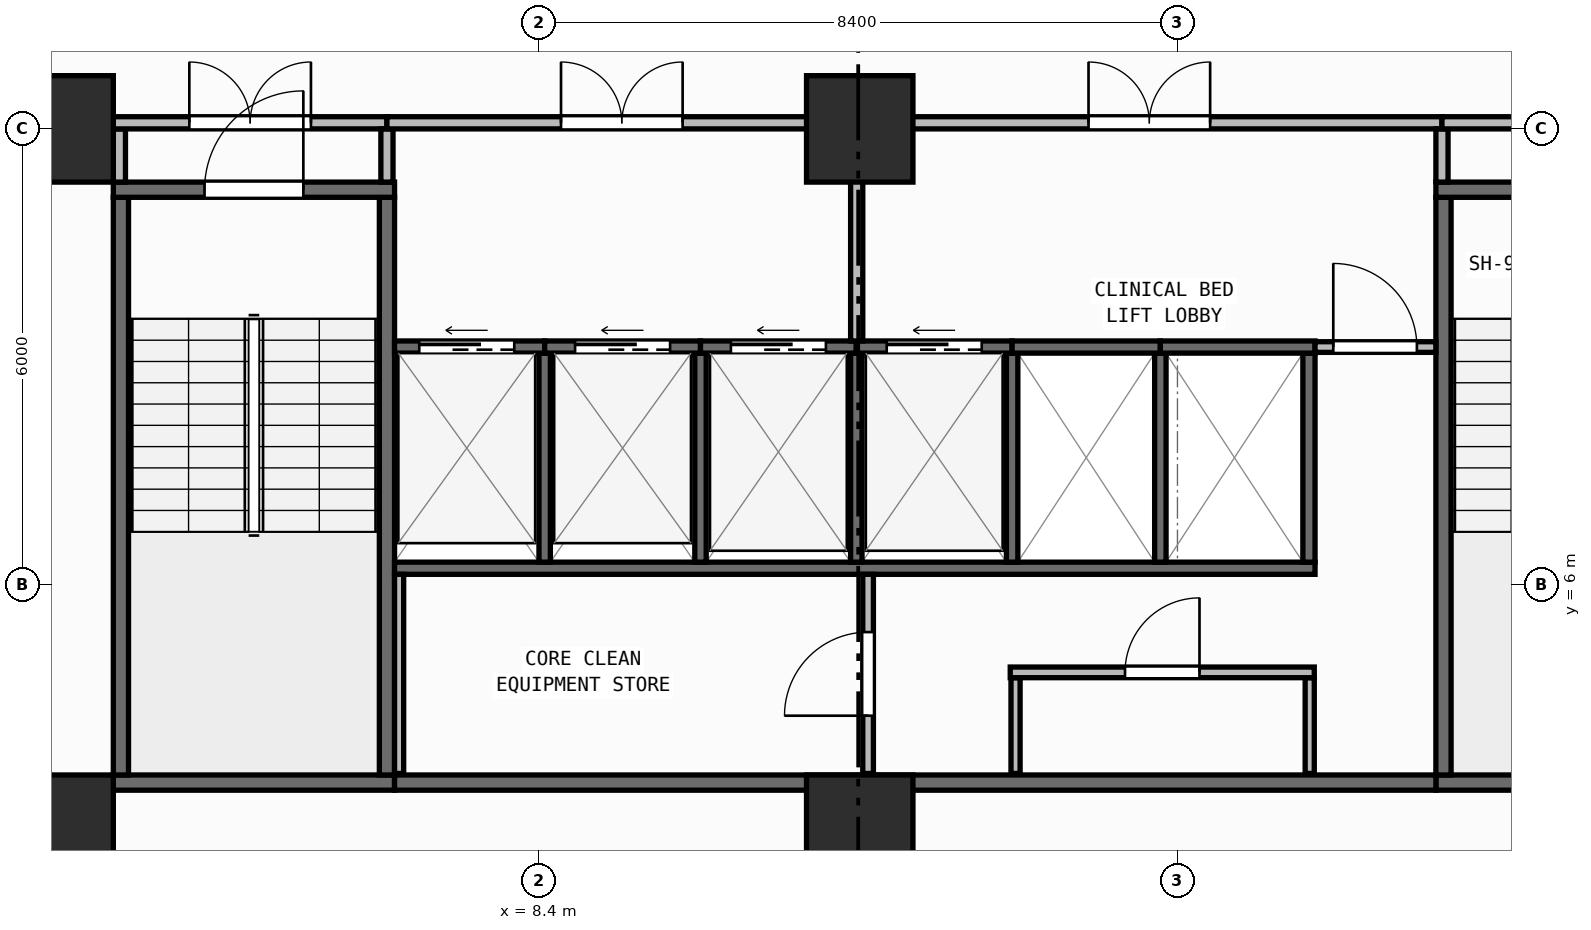
"""IFC4 building model, lengths in metres.
Left out: names, types, materials, properties, quantities, classifications, styles, units other than length and angle.
Written with IfcOpenShell. Run it as: python <this file> out.ifc"""

import sys

from ifc_helpers import new_model, si_unit, direction, frame, frame_2d, origin, origin_2d, place, context, subcontext, project, spatial, rectangle, extrude, element, fill, save


model = new_model("IFC4")
c1 = context("Model", 3, precision=1e-05, world=origin(), true_north=direction((0.0, 1.0)))
c2 = subcontext(c1, "Body", "Model", "MODEL_VIEW")
j1 = project(units=[si_unit("LENGTHUNIT", "METRE"), si_unit("PLANEANGLEUNIT", "RADIAN")], contexts=[c1])
p1 = place(None, origin())
s1 = spatial("IfcSite", under=j1, at=p1, CompositionType="ELEMENT")
p2 = place(p1, origin())
s2 = spatial("IfcBuilding", under=s1, at=p2, CompositionType="ELEMENT")
p3 = place(p2, frame((0.0, 0.0, 42.25)))
s3 = spatial("IfcBuildingStorey", under=s2, at=p3, CompositionType="ELEMENT", Elevation=42.25)
for number, where, z_axis, x_axis in (
    (1, (2.1, 2.8, 0.0), (0.0, 0.0, 1.0), (1.0, 0.0, 0.0)),
    (2, (12.62, 2.8, 0.0), (0.0, 0.0, 1.0), (1.0, 0.0, 0.0)),
    (3, (2.1, 12.0, 0.0), (0.0, 0.0, 1.0), (1.0, 0.0, 0.0)),
    (4, (12.62, 12.0, 0.0), (0.0, 0.0, 1.0), (1.0, 0.0, 0.0)),
):
    element("IfcColumn", number, at=place(p3, frame(where, z_axis=z_axis, x_axis=x_axis)), inside=s3, PredefinedType="COLUMN", context=c2, shape_type="SweptSolid", body=[
        extrude(rectangle(XDim=1.4, YDim=1.4, at=origin_2d()), origin(), (0.0, 0.0, 1.0), 3.95),
    ])
p4 = place(p3, frame((2.76, 0.174, 0.0), z_axis=(0.0, 0.0, 1.0), x_axis=(0.996571478456, 0.082736257641, 0.0)))
e5 = element("IfcWall", 5, at=p4, inside=s3, PredefinedType="STANDARD", context=c2, shape_type="SweptSolid", body=[
    extrude(rectangle(XDim=52.861, YDim=0.26, at=frame_2d((26.431, 0.0))), origin(), (0.0, 0.0, 1.0), 3.71),
])
p5 = place(p4, frame((25.231, 0.0, 0.9)))
e6 = element("IfcOpeningElement", 6, at=p5, cuts=e5, PredefinedType="OPENING", context=c2, shape_type="SweptSolid", body=[
    extrude(rectangle(XDim=2.4, YDim=1.65, at=frame_2d((1.2, 0.825))), frame((0.0, 0.14, 0.0), z_axis=(0.0, -1.0, 0.0), x_axis=(1.0, 0.0, 0.0)), (0.0, 0.0, 1.0), 0.28),
])
p6 = place(p3, frame((2.8, 3.4, 0.0), z_axis=(0.0, 0.0, 1.0), x_axis=(1.0, 0.0, 0.0)))
e7 = element("IfcWall", 7, at=p6, inside=s3, PredefinedType="SHEAR", context=c2, shape_type="SweptSolid", body=[
    extrude(rectangle(XDim=3.7, YDim=0.2, at=frame_2d((1.85, 0.0))), origin(), (0.0, 0.0, 1.0), 3.71),
])
for number, where, z_axis, x_axis in (
    (8, (2.9, 3.5, 0.0), (0.0, 0.0, 1.0), (0.0, 1.0, 0.0)),
    (9, (6.4, 3.5, 0.0), (0.0, 0.0, 1.0), (0.0, 1.0, 0.0)),
):
    element("IfcWall", number, at=place(p3, frame(where, z_axis=z_axis, x_axis=x_axis)), inside=s3, PredefinedType="SHEAR", context=c2, shape_type="SweptSolid", body=[
        extrude(rectangle(XDim=7.6, YDim=0.2, at=frame_2d((3.8, 0.0))), origin(), (0.0, 0.0, 1.0), 3.71),
    ])
p7 = place(p3, frame((2.8, 11.2, 0.0), z_axis=(0.0, 0.0, 1.0), x_axis=(1.0, 0.0, 0.0)))
e10 = element("IfcWall", 10, at=p7, inside=s3, PredefinedType="SHEAR", context=c2, shape_type="SweptSolid", body=[
    extrude(rectangle(XDim=3.7, YDim=0.2, at=frame_2d((1.85, 0.0))), origin(), (0.0, 0.0, 1.0), 3.71),
])
p8 = place(p7, frame((1.2, 0.0, 0.0)))
e11 = element("IfcOpeningElement", 11, at=p8, cuts=e10, PredefinedType="OPENING", context=c2, shape_type="SweptSolid", body=[
    extrude(rectangle(XDim=1.3, YDim=2.15, at=frame_2d((0.65, 1.075))), frame((0.0, 0.11, 0.0), z_axis=(0.0, -1.0, 0.0), x_axis=(1.0, 0.0, 0.0)), (0.0, 0.0, 1.0), 0.22),
])
p9 = place(p3, frame((20.2, 3.4, 0.0), z_axis=(0.0, 0.0, 1.0), x_axis=(1.0, 0.0, 0.0)))
e12 = element("IfcWall", 12, at=p9, inside=s3, PredefinedType="SHEAR", context=c2, shape_type="SweptSolid", body=[
    extrude(rectangle(XDim=3.7, YDim=0.2, at=frame_2d((1.85, 0.0))), origin(), (0.0, 0.0, 1.0), 3.71),
])
p10 = place(p3, frame((20.3, 3.5, 0.0), z_axis=(0.0, 0.0, 1.0), x_axis=(0.0, 1.0, 0.0)))
e13 = element("IfcWall", 13, at=p10, inside=s3, PredefinedType="SHEAR", context=c2, shape_type="SweptSolid", body=[
    extrude(rectangle(XDim=7.6, YDim=0.2, at=frame_2d((3.8, 0.0))), origin(), (0.0, 0.0, 1.0), 3.71),
])
p11 = place(p3, frame((20.2, 11.2, 0.0), z_axis=(0.0, 0.0, 1.0), x_axis=(1.0, 0.0, 0.0)))
e14 = element("IfcWall", 14, at=p11, inside=s3, PredefinedType="SHEAR", context=c2, shape_type="SweptSolid", body=[
    extrude(rectangle(XDim=3.7, YDim=0.2, at=frame_2d((1.85, 0.0))), origin(), (0.0, 0.0, 1.0), 3.71),
])
p12 = place(p11, frame((1.2, 0.0, 0.0)))
e15 = element("IfcOpeningElement", 15, at=p12, cuts=e14, PredefinedType="OPENING", context=c2, shape_type="SweptSolid", body=[
    extrude(rectangle(XDim=1.3, YDim=2.15, at=frame_2d((0.65, 1.075))), frame((0.0, 0.11, 0.0), z_axis=(0.0, -1.0, 0.0), x_axis=(1.0, 0.0, 0.0)), (0.0, 0.0, 1.0), 0.22),
])
p13 = place(p3, frame((6.5, 3.4, 0.0), z_axis=(0.0, 0.0, 1.0), x_axis=(1.0, 0.0, 0.0)))
e16 = element("IfcWall", 16, at=p13, inside=s3, PredefinedType="SHEAR", context=c2, shape_type="SweptSolid", body=[
    extrude(rectangle(XDim=13.7, YDim=0.2, at=frame_2d((6.85, 0.0))), origin(), (0.0, 0.0, 1.0), 3.71),
])
p14 = place(p3, frame((6.5, 6.22, 0.0), z_axis=(0.0, 0.0, 1.0), x_axis=(1.0, 0.0, 0.0)))
e17 = element("IfcWall", 17, at=p14, inside=s3, PredefinedType="SHEAR", context=c2, shape_type="SweptSolid", body=[
    extrude(rectangle(XDim=12.11, YDim=0.16, at=frame_2d((6.055, 0.0))), origin(), (0.0, 0.0, 1.0), 3.71),
])
p15 = place(p3, frame((18.53, 6.3, 0.0), z_axis=(0.0, 0.0, 1.0), x_axis=(0.0, 1.0, 0.0)))
e18 = element("IfcWall", 18, at=p15, inside=s3, PredefinedType="SHEAR", context=c2, shape_type="SweptSolid", body=[
    extrude(rectangle(XDim=2.75, YDim=0.16, at=frame_2d((1.375, 0.0))), origin(), (0.0, 0.0, 1.0), 3.71),
])
for number, where, z_axis, x_axis in (
    (19, (8.475, 6.3, 0.0), (0.0, 0.0, 1.0), (0.0, 1.0, 0.0)),
    (20, (10.525, 6.3, 0.0), (0.0, 0.0, 1.0), (0.0, 1.0, 0.0)),
    (21, (12.575, 6.3, 0.0), (0.0, 0.0, 1.0), (0.0, 1.0, 0.0)),
    (22, (14.625, 6.3, 0.0), (0.0, 0.0, 1.0), (0.0, 1.0, 0.0)),
    (23, (16.575, 6.3, 0.0), (0.0, 0.0, 1.0), (0.0, 1.0, 0.0)),
):
    element("IfcWall", number, at=place(p3, frame(where, z_axis=z_axis, x_axis=x_axis)), inside=s3, PredefinedType="SHEAR", context=c2, shape_type="SweptSolid", body=[
        extrude(rectangle(XDim=2.75, YDim=0.15, at=frame_2d((1.375, 0.0))), origin(), (0.0, 0.0, 1.0), 3.71),
    ])
p16 = place(p3, frame((6.5, 9.13, 0.0), z_axis=(0.0, 0.0, 1.0), x_axis=(1.0, 0.0, 0.0)))
e24 = element("IfcWall", 24, at=p16, inside=s3, PredefinedType="SHEAR", context=c2, shape_type="SweptSolid", body=[
    extrude(rectangle(XDim=1.975, YDim=0.16, at=frame_2d((0.988, 0.0))), origin(), (0.0, 0.0, 1.0), 3.71),
])
p17 = place(p16, frame((0.325, 0.0, 0.0)))
e25 = element("IfcOpeningElement", 25, at=p17, cuts=e24, PredefinedType="OPENING", context=c2, shape_type="SweptSolid", body=[
    extrude(rectangle(XDim=1.25, YDim=2.15, at=frame_2d((0.625, 1.075))), frame((0.0, 0.09, 0.0), z_axis=(0.0, -1.0, 0.0), x_axis=(1.0, 0.0, 0.0)), (0.0, 0.0, 1.0), 0.18),
])
p18 = place(p3, frame((8.475, 9.13, 0.0), z_axis=(0.0, 0.0, 1.0), x_axis=(1.0, 0.0, 0.0)))
e26 = element("IfcWall", 26, at=p18, inside=s3, PredefinedType="SHEAR", context=c2, shape_type="SweptSolid", body=[
    extrude(rectangle(XDim=2.05, YDim=0.16, at=frame_2d((1.025, 0.0))), origin(), (0.0, 0.0, 1.0), 3.71),
])
p19 = place(p18, frame((0.4, 0.0, 0.0)))
e27 = element("IfcOpeningElement", 27, at=p19, cuts=e26, PredefinedType="OPENING", context=c2, shape_type="SweptSolid", body=[
    extrude(rectangle(XDim=1.25, YDim=2.15, at=frame_2d((0.625, 1.075))), frame((0.0, 0.09, 0.0), z_axis=(0.0, -1.0, 0.0), x_axis=(1.0, 0.0, 0.0)), (0.0, 0.0, 1.0), 0.18),
])
p20 = place(p3, frame((10.525, 9.13, 0.0), z_axis=(0.0, 0.0, 1.0), x_axis=(1.0, 0.0, 0.0)))
e28 = element("IfcWall", 28, at=p20, inside=s3, PredefinedType="SHEAR", context=c2, shape_type="SweptSolid", body=[
    extrude(rectangle(XDim=2.05, YDim=0.16, at=frame_2d((1.025, 0.0))), origin(), (0.0, 0.0, 1.0), 3.71),
])
p21 = place(p20, frame((0.4, 0.0, 0.0)))
e29 = element("IfcOpeningElement", 29, at=p21, cuts=e28, PredefinedType="OPENING", context=c2, shape_type="SweptSolid", body=[
    extrude(rectangle(XDim=1.25, YDim=2.15, at=frame_2d((0.625, 1.075))), frame((0.0, 0.09, 0.0), z_axis=(0.0, -1.0, 0.0), x_axis=(1.0, 0.0, 0.0)), (0.0, 0.0, 1.0), 0.18),
])
p22 = place(p3, frame((12.575, 9.13, 0.0), z_axis=(0.0, 0.0, 1.0), x_axis=(1.0, 0.0, 0.0)))
e30 = element("IfcWall", 30, at=p22, inside=s3, PredefinedType="SHEAR", context=c2, shape_type="SweptSolid", body=[
    extrude(rectangle(XDim=2.05, YDim=0.16, at=frame_2d((1.025, 0.0))), origin(), (0.0, 0.0, 1.0), 3.71),
])
p23 = place(p22, frame((0.4, 0.0, 0.0)))
e31 = element("IfcOpeningElement", 31, at=p23, cuts=e30, PredefinedType="OPENING", context=c2, shape_type="SweptSolid", body=[
    extrude(rectangle(XDim=1.25, YDim=2.15, at=frame_2d((0.625, 1.075))), frame((0.0, 0.09, 0.0), z_axis=(0.0, -1.0, 0.0), x_axis=(1.0, 0.0, 0.0)), (0.0, 0.0, 1.0), 0.18),
])
p24 = place(p3, frame((14.625, 9.13, 0.0), z_axis=(0.0, 0.0, 1.0), x_axis=(1.0, 0.0, 0.0)))
e32 = element("IfcWall", 32, at=p24, inside=s3, PredefinedType="SHEAR", context=c2, shape_type="SweptSolid", body=[
    extrude(rectangle(XDim=1.95, YDim=0.16, at=frame_2d((0.975, 0.0))), origin(), (0.0, 0.0, 1.0), 3.71),
])
p25 = place(p3, frame((16.575, 9.13, 0.0), z_axis=(0.0, 0.0, 1.0), x_axis=(1.0, 0.0, 0.0)))
e33 = element("IfcWall", 33, at=p25, inside=s3, PredefinedType="SHEAR", context=c2, shape_type="SweptSolid", body=[
    extrude(rectangle(XDim=2.035, YDim=0.16, at=frame_2d((1.018, 0.0))), origin(), (0.0, 0.0, 1.0), 3.71),
])
p26 = place(p3, frame((6.56, 3.52, 0.0), z_axis=(0.0, 0.0, 1.0), x_axis=(0.0, 1.0, 0.0)))
e34 = element("IfcWall", 34, at=p26, inside=s3, PredefinedType="PARTITIONING", context=c2, shape_type="SweptSolid", body=[
    extrude(rectangle(XDim=2.62, YDim=0.12, at=frame_2d((1.31, 0.0))), origin(), (0.0, 0.0, 1.0), 3.71),
])
p27 = place(p3, frame((12.73, 3.52, 0.0), z_axis=(0.0, 0.0, 1.0), x_axis=(0.0, 1.0, 0.0)))
e35 = element("IfcWall", 35, at=p27, inside=s3, PredefinedType="PARTITIONING", context=c2, shape_type="SweptSolid", body=[
    extrude(rectangle(XDim=2.62, YDim=0.14, at=frame_2d((1.31, 0.0))), origin(), (0.0, 0.0, 1.0), 3.71),
])
p28 = place(p27, frame((0.76, 0.0, 0.0)))
e36 = element("IfcOpeningElement", 36, at=p28, cuts=e35, PredefinedType="OPENING", context=c2, shape_type="SweptSolid", body=[
    extrude(rectangle(XDim=1.1, YDim=2.1, at=frame_2d((0.55, 1.05))), frame((0.0, 0.08, 0.0), z_axis=(0.0, -1.0, 0.0), x_axis=(1.0, 0.0, 0.0)), (0.0, 0.0, 1.0), 0.16),
])
for number, where, z_axis, x_axis in (
    (37, (14.67, 3.52, 0.0), (0.0, 0.0, 1.0), (0.0, 1.0, 0.0)),
    (38, (18.54, 3.52, 0.0), (0.0, 0.0, 1.0), (0.0, 1.0, 0.0)),
):
    element("IfcWall", number, at=place(p3, frame(where, z_axis=z_axis, x_axis=x_axis)), inside=s3, PredefinedType="PARTITIONING", context=c2, shape_type="SweptSolid", body=[
        extrude(rectangle(XDim=1.26, YDim=0.12, at=frame_2d((0.63, 0.0))), origin(), (0.0, 0.0, 1.0), 3.71),
    ])
p29 = place(p3, frame((14.6, 4.85, 0.0), z_axis=(0.0, 0.0, 1.0), x_axis=(1.0, 0.0, 0.0)))
e39 = element("IfcWall", 39, at=p29, inside=s3, PredefinedType="PARTITIONING", context=c2, shape_type="SweptSolid", body=[
    extrude(rectangle(XDim=4.0, YDim=0.14, at=frame_2d((2.0, 0.0))), origin(), (0.0, 0.0, 1.0), 3.71),
])
p30 = place(p29, frame((1.51, 0.0, 0.0)))
e40 = element("IfcOpeningElement", 40, at=p30, cuts=e39, PredefinedType="OPENING", context=c2, shape_type="SweptSolid", body=[
    extrude(rectangle(XDim=0.98, YDim=2.1, at=frame_2d((0.49, 1.05))), frame((0.0, 0.08, 0.0), z_axis=(0.0, -1.0, 0.0), x_axis=(1.0, 0.0, 0.0)), (0.0, 0.0, 1.0), 0.16),
])
p31 = place(p3, frame((18.61, 9.13, 0.0), z_axis=(0.0, 0.0, 1.0), x_axis=(1.0, 0.0, 0.0)))
e41 = element("IfcWall", 41, at=p31, inside=s3, PredefinedType="PARTITIONING", context=c2, shape_type="SweptSolid", body=[
    extrude(rectangle(XDim=1.59, YDim=0.14, at=frame_2d((0.795, 0.0))), origin(), (0.0, 0.0, 1.0), 3.71),
])
p32 = place(p31, frame((0.24, 0.0, 0.0)))
e42 = element("IfcOpeningElement", 42, at=p32, cuts=e41, PredefinedType="OPENING", context=c2, shape_type="SweptSolid", body=[
    extrude(rectangle(XDim=1.1, YDim=2.1, at=frame_2d((0.55, 1.05))), frame((0.0, 0.08, 0.0), z_axis=(0.0, -1.0, 0.0), x_axis=(1.0, 0.0, 0.0)), (0.0, 0.0, 1.0), 0.16),
])
p33 = place(p3, frame((2.88, 11.3, 0.0), z_axis=(0.0, 0.0, 1.0), x_axis=(0.0, 1.0, 0.0)))
e43 = element("IfcWall", 43, at=p33, inside=s3, PredefinedType="PARTITIONING", context=c2, shape_type="SweptSolid", body=[
    extrude(rectangle(XDim=0.7, YDim=0.16, at=frame_2d((0.35, 0.0))), origin(), (0.0, 0.0, 1.0), 3.71),
])
p34 = place(p3, frame((2.8, 12.08, 0.0), z_axis=(0.0, 0.0, 1.0), x_axis=(1.0, 0.0, 0.0)))
e44 = element("IfcWall", 44, at=p34, inside=s3, PredefinedType="PARTITIONING", context=c2, shape_type="SweptSolid", body=[
    extrude(rectangle(XDim=3.6, YDim=0.16, at=frame_2d((1.8, 0.0))), origin(), (0.0, 0.0, 1.0), 3.073),
])
p35 = place(p34, frame((1.0, 0.0, 0.0)))
e45 = element("IfcOpeningElement", 45, at=p35, cuts=e44, PredefinedType="OPENING", context=c2, shape_type="SweptSolid", body=[
    extrude(rectangle(XDim=1.6, YDim=2.05, at=frame_2d((0.8, 1.025))), frame((0.0, 0.09, 0.0), z_axis=(0.0, -1.0, 0.0), x_axis=(1.0, 0.0, 0.0)), (0.0, 0.0, 1.0), 0.18),
])
p36 = place(p3, frame((6.4, 11.3, 0.0), z_axis=(0.0, 0.0, 1.0), x_axis=(0.0, 1.0, 0.0)))
e46 = element("IfcWall", 46, at=p36, inside=s3, PredefinedType="PARTITIONING", context=c2, shape_type="SweptSolid", body=[
    extrude(rectangle(XDim=0.7, YDim=0.16, at=frame_2d((0.35, 0.0))), origin(), (0.0, 0.0, 1.0), 3.71),
])
p37 = place(p3, frame((6.4, 12.08, 0.0), z_axis=(0.0, 0.0, 1.0), x_axis=(1.0, 0.0, 0.0)))
e47 = element("IfcWall", 47, at=p37, inside=s3, PredefinedType="PARTITIONING", context=c2, shape_type="SweptSolid", body=[
    extrude(rectangle(XDim=6.18, YDim=0.16, at=frame_2d((3.09, 0.0))), origin(), (0.0, 0.0, 1.0), 3.073),
])
p38 = place(p37, frame((2.29, 0.0, 0.0)))
e48 = element("IfcOpeningElement", 48, at=p38, cuts=e47, PredefinedType="OPENING", context=c2, shape_type="SweptSolid", body=[
    extrude(rectangle(XDim=1.6, YDim=2.05, at=frame_2d((0.8, 1.025))), frame((0.0, 0.09, 0.0), z_axis=(0.0, -1.0, 0.0), x_axis=(1.0, 0.0, 0.0)), (0.0, 0.0, 1.0), 0.18),
])
p39 = place(p3, frame((12.58, 9.21, 0.0), z_axis=(0.0, 0.0, 1.0), x_axis=(0.0, 1.0, 0.0)))
e49 = element("IfcWall", 49, at=p39, inside=s3, PredefinedType="PARTITIONING", context=c2, shape_type="SweptSolid", body=[
    extrude(rectangle(XDim=2.79, YDim=0.16, at=frame_2d((1.395, 0.0))), origin(), (0.0, 0.0, 1.0), 3.71),
])
p40 = place(p3, frame((12.58, 12.08, 0.0), z_axis=(0.0, 0.0, 1.0), x_axis=(1.0, 0.0, 0.0)))
e50 = element("IfcWall", 50, at=p40, inside=s3, PredefinedType="PARTITIONING", context=c2, shape_type="SweptSolid", body=[
    extrude(rectangle(XDim=7.7, YDim=0.16, at=frame_2d((3.85, 0.0))), origin(), (0.0, 0.0, 1.0), 3.073),
])
p41 = place(p40, frame((3.05, 0.0, 0.0)))
e51 = element("IfcOpeningElement", 51, at=p41, cuts=e50, PredefinedType="OPENING", context=c2, shape_type="SweptSolid", body=[
    extrude(rectangle(XDim=1.6, YDim=2.05, at=frame_2d((0.8, 1.025))), frame((0.0, 0.09, 0.0), z_axis=(0.0, -1.0, 0.0), x_axis=(1.0, 0.0, 0.0)), (0.0, 0.0, 1.0), 0.18),
])
p42 = place(p3, frame((20.28, 11.3, 0.0), z_axis=(0.0, 0.0, 1.0), x_axis=(0.0, 1.0, 0.0)))
e52 = element("IfcWall", 52, at=p42, inside=s3, PredefinedType="PARTITIONING", context=c2, shape_type="SweptSolid", body=[
    extrude(rectangle(XDim=0.7, YDim=0.16, at=frame_2d((0.35, 0.0))), origin(), (0.0, 0.0, 1.0), 3.71),
])
p43 = place(p3, frame((20.28, 12.08, 0.0), z_axis=(0.0, 0.0, 1.0), x_axis=(1.0, 0.0, 0.0)))
e53 = element("IfcWall", 53, at=p43, inside=s3, PredefinedType="PARTITIONING", context=c2, shape_type="SweptSolid", body=[
    extrude(rectangle(XDim=3.62, YDim=0.16, at=frame_2d((1.81, 0.0))), origin(), (0.0, 0.0, 1.0), 3.073),
])
p44 = place(p43, frame((1.01, 0.0, 0.0)))
e54 = element("IfcOpeningElement", 54, at=p44, cuts=e53, PredefinedType="OPENING", context=c2, shape_type="SweptSolid", body=[
    extrude(rectangle(XDim=1.6, YDim=2.05, at=frame_2d((0.8, 1.025))), frame((0.0, 0.09, 0.0), z_axis=(0.0, -1.0, 0.0), x_axis=(1.0, 0.0, 0.0)), (0.0, 0.0, 1.0), 0.18),
])
p45 = place(p8, origin())
e55 = element("IfcDoor", 55, at=p45, inside=s3, OperationType="SINGLE_SWING_RIGHT", PredefinedType="DOOR", context=c2, shape_type="SweptSolid", body=[
    extrude(rectangle(XDim=1.3, YDim=2.15, at=frame_2d((0.65, 1.075))), frame((0.0, 0.025, 0.0), z_axis=(0.0, -1.0, 0.0), x_axis=(1.0, 0.0, 0.0)), (0.0, 0.0, 1.0), 0.05),
])
fill(e11, e55)
p46 = place(p17, origin())
e56 = element("IfcDoor", 56, at=p46, inside=s3, OperationType="SLIDING_TO_LEFT", PredefinedType="DOOR", context=c2, shape_type="SweptSolid", body=[
    extrude(rectangle(XDim=1.25, YDim=2.15, at=frame_2d((0.625, 1.075))), frame((0.0, 0.025, 0.0), z_axis=(0.0, -1.0, 0.0), x_axis=(1.0, 0.0, 0.0)), (0.0, 0.0, 1.0), 0.05),
])
fill(e25, e56)
p47 = place(p19, origin())
e57 = element("IfcDoor", 57, at=p47, inside=s3, OperationType="SLIDING_TO_LEFT", PredefinedType="DOOR", context=c2, shape_type="SweptSolid", body=[
    extrude(rectangle(XDim=1.25, YDim=2.15, at=frame_2d((0.625, 1.075))), frame((0.0, 0.025, 0.0), z_axis=(0.0, -1.0, 0.0), x_axis=(1.0, 0.0, 0.0)), (0.0, 0.0, 1.0), 0.05),
])
fill(e27, e57)
p48 = place(p21, origin())
e58 = element("IfcDoor", 58, at=p48, inside=s3, OperationType="SLIDING_TO_LEFT", PredefinedType="DOOR", context=c2, shape_type="SweptSolid", body=[
    extrude(rectangle(XDim=1.25, YDim=2.15, at=frame_2d((0.625, 1.075))), frame((0.0, 0.025, 0.0), z_axis=(0.0, -1.0, 0.0), x_axis=(1.0, 0.0, 0.0)), (0.0, 0.0, 1.0), 0.05),
])
fill(e29, e58)
p49 = place(p23, origin())
e59 = element("IfcDoor", 59, at=p49, inside=s3, OperationType="SLIDING_TO_LEFT", PredefinedType="DOOR", context=c2, shape_type="SweptSolid", body=[
    extrude(rectangle(XDim=1.25, YDim=2.15, at=frame_2d((0.625, 1.075))), frame((0.0, 0.025, 0.0), z_axis=(0.0, -1.0, 0.0), x_axis=(1.0, 0.0, 0.0)), (0.0, 0.0, 1.0), 0.05),
])
fill(e31, e59)
p50 = place(p28, origin())
e60 = element("IfcDoor", 60, at=p50, inside=s3, OperationType="SINGLE_SWING_LEFT", PredefinedType="DOOR", context=c2, shape_type="SweptSolid", body=[
    extrude(rectangle(XDim=1.1, YDim=2.1, at=frame_2d((0.55, 1.05))), frame((0.0, 0.025, 0.0), z_axis=(0.0, -1.0, 0.0), x_axis=(1.0, 0.0, 0.0)), (0.0, 0.0, 1.0), 0.05),
])
fill(e36, e60)
p51 = place(p30, origin())
e61 = element("IfcDoor", 61, at=p51, inside=s3, OperationType="SINGLE_SWING_RIGHT", PredefinedType="DOOR", context=c2, shape_type="SweptSolid", body=[
    extrude(rectangle(XDim=0.98, YDim=2.1, at=frame_2d((0.49, 1.05))), frame((0.0, 0.025, 0.0), z_axis=(0.0, -1.0, 0.0), x_axis=(1.0, 0.0, 0.0)), (0.0, 0.0, 1.0), 0.05),
])
fill(e40, e61)
p52 = place(p32, origin())
e62 = element("IfcDoor", 62, at=p52, inside=s3, OperationType="SINGLE_SWING_LEFT", PredefinedType="DOOR", context=c2, shape_type="SweptSolid", body=[
    extrude(rectangle(XDim=1.1, YDim=2.1, at=frame_2d((0.55, 1.05))), frame((0.0, 0.025, 0.0), z_axis=(0.0, -1.0, 0.0), x_axis=(1.0, 0.0, 0.0)), (0.0, 0.0, 1.0), 0.05),
])
fill(e42, e62)
p53 = place(p35, origin())
e63 = element("IfcDoor", 63, at=p53, inside=s3, OperationType="DOUBLE_DOOR_SINGLE_SWING", PredefinedType="DOOR", context=c2, shape_type="SweptSolid", body=[
    extrude(rectangle(XDim=1.6, YDim=2.05, at=frame_2d((0.8, 1.025))), frame((0.0, 0.025, 0.0), z_axis=(0.0, -1.0, 0.0), x_axis=(1.0, 0.0, 0.0)), (0.0, 0.0, 1.0), 0.05),
])
fill(e45, e63)
p54 = place(p38, origin())
e64 = element("IfcDoor", 64, at=p54, inside=s3, OperationType="DOUBLE_DOOR_SINGLE_SWING", PredefinedType="DOOR", context=c2, shape_type="SweptSolid", body=[
    extrude(rectangle(XDim=1.6, YDim=2.05, at=frame_2d((0.8, 1.025))), frame((0.0, 0.025, 0.0), z_axis=(0.0, -1.0, 0.0), x_axis=(1.0, 0.0, 0.0)), (0.0, 0.0, 1.0), 0.05),
])
fill(e48, e64)
p55 = place(p41, origin())
e65 = element("IfcDoor", 65, at=p55, inside=s3, OperationType="DOUBLE_DOOR_SINGLE_SWING", PredefinedType="DOOR", context=c2, shape_type="SweptSolid", body=[
    extrude(rectangle(XDim=1.6, YDim=2.05, at=frame_2d((0.8, 1.025))), frame((0.0, 0.025, 0.0), z_axis=(0.0, -1.0, 0.0), x_axis=(1.0, 0.0, 0.0)), (0.0, 0.0, 1.0), 0.05),
])
fill(e51, e65)
save(model, sys.argv[1])
